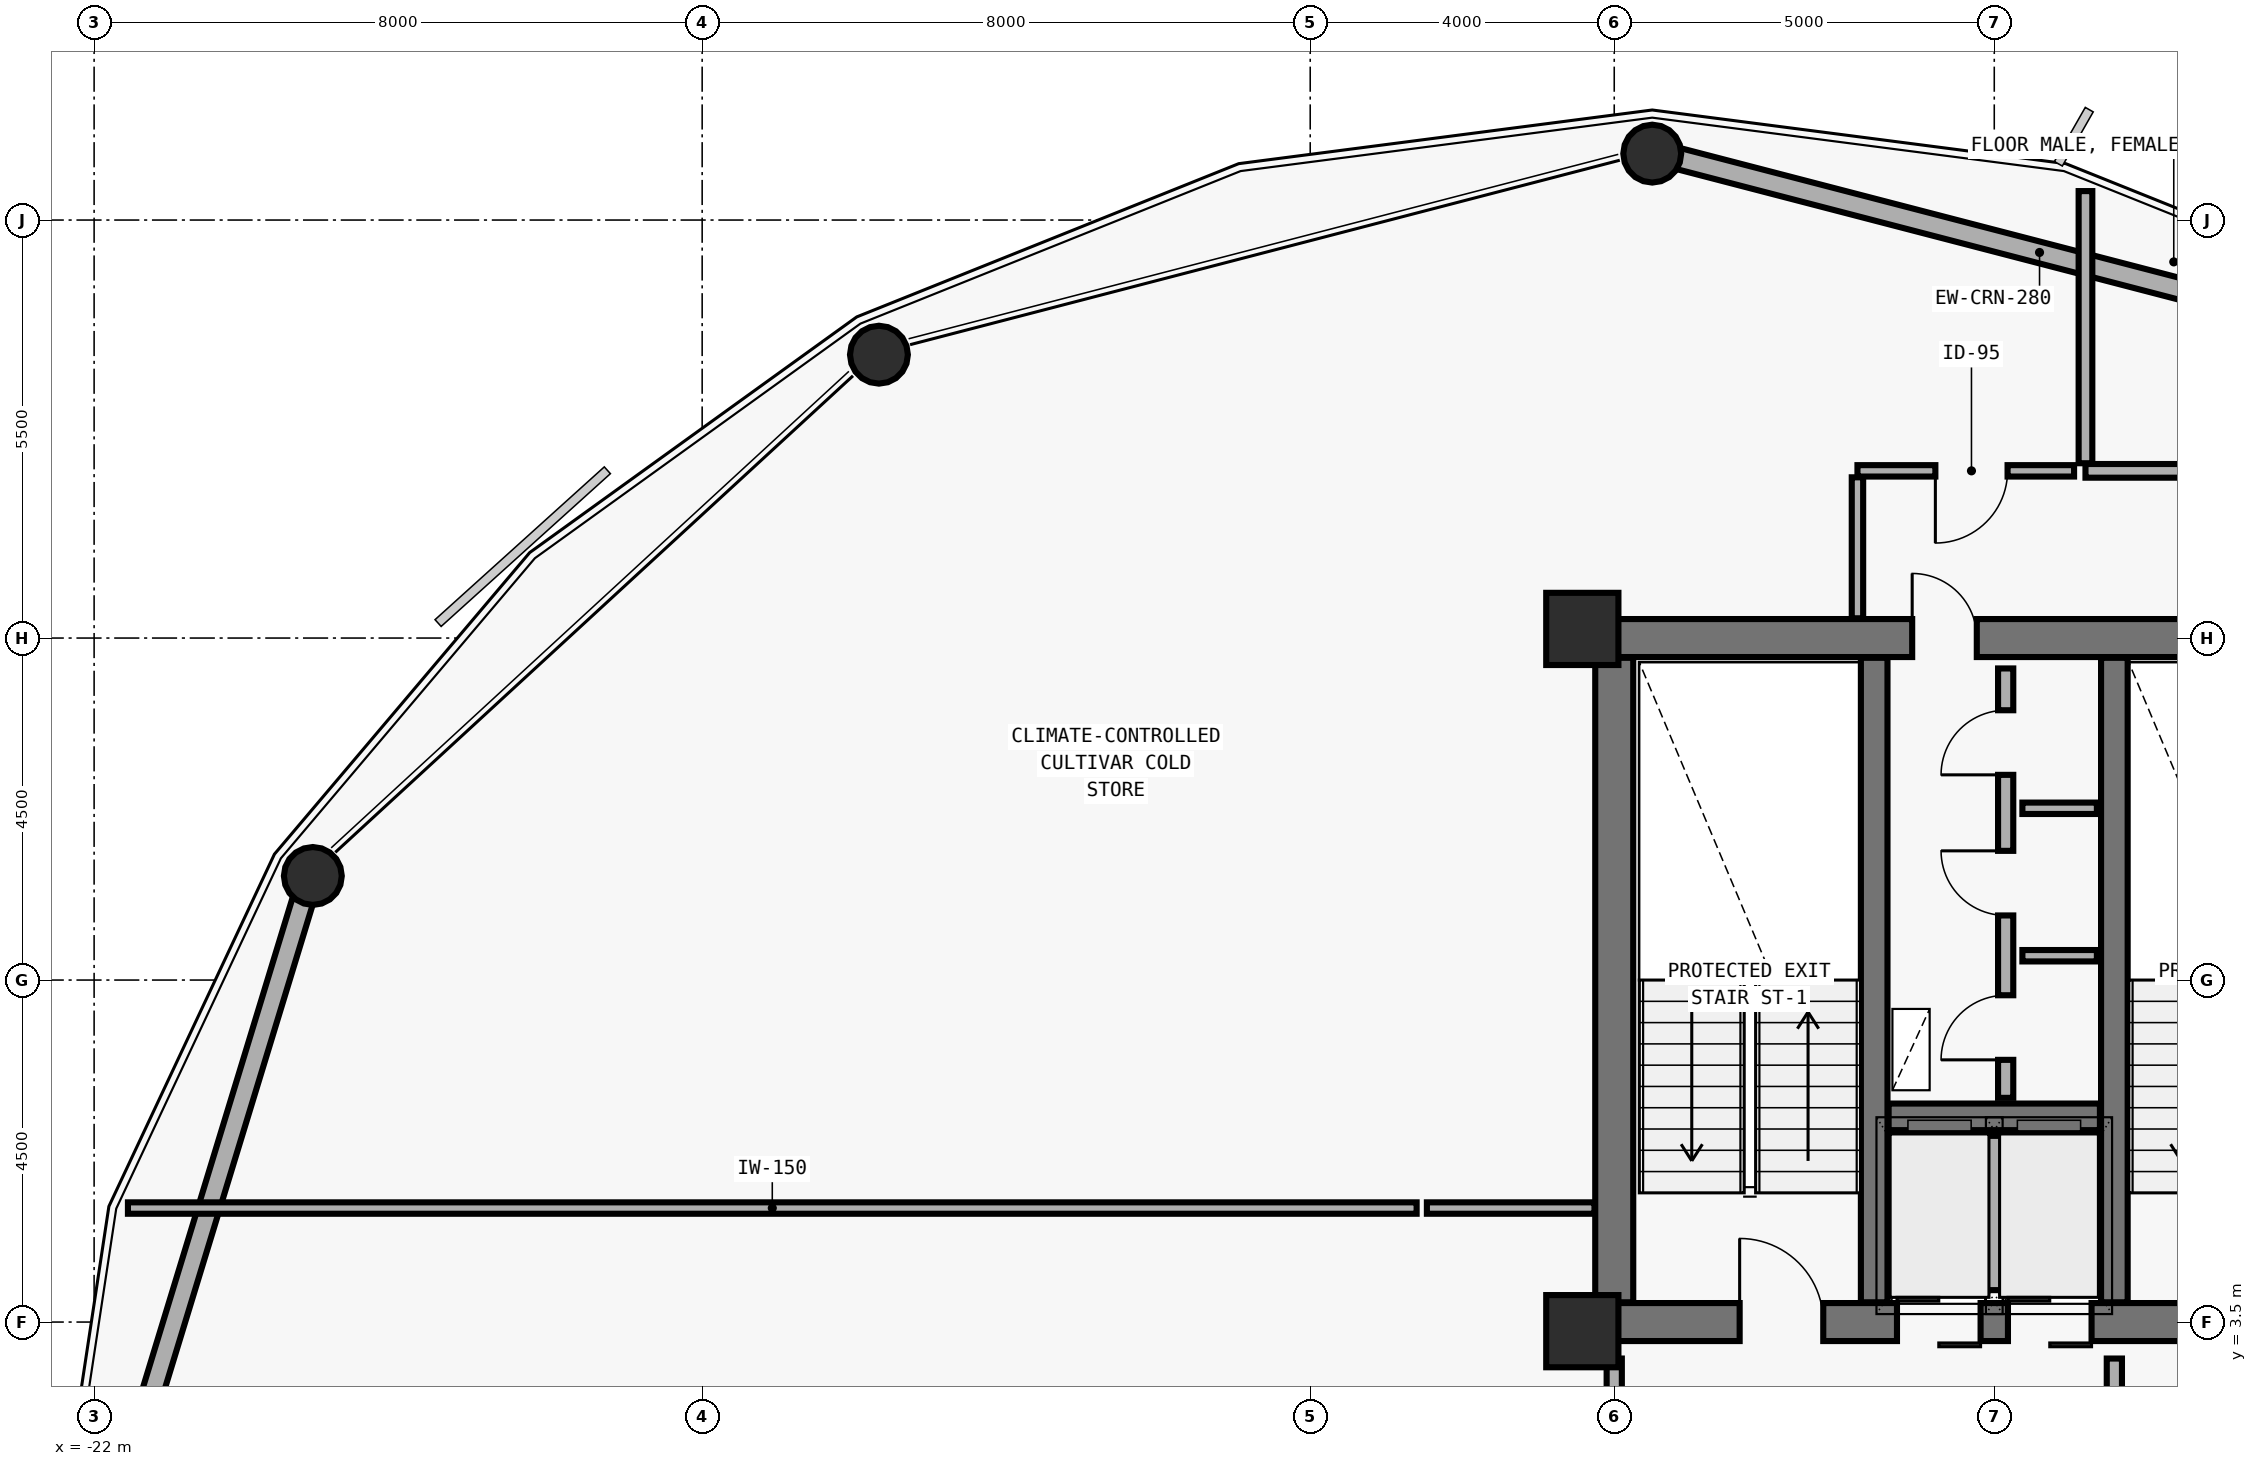
"""IFC4 building model, lengths in metres.
Left out: names, types, materials, properties, quantities, classifications, styles, units other than length and angle.
Written with IfcOpenShell. Run it as: python <this file> out.ifc"""

import sys

from ifc_helpers import new_model, si_unit, direction, frame, frame_2d, origin, origin_2d, place, context, subcontext, project, spatial, rectangle, hollow_circle, extrude, element, fill, save


model = new_model("IFC4")
c1 = context("Model", 3, precision=1e-05, world=origin(), true_north=direction((0.0, 1.0)))
c2 = subcontext(c1, "Body", "Model", "MODEL_VIEW")
j1 = project(units=[si_unit("LENGTHUNIT", "METRE"), si_unit("PLANEANGLEUNIT", "RADIAN")], contexts=[c1])
p1 = place(None, origin())
s1 = spatial("IfcSite", under=j1, at=p1, CompositionType="ELEMENT")
p2 = place(p1, origin())
s2 = spatial("IfcBuilding", under=s1, at=p2, CompositionType="ELEMENT")
p3 = place(p2, frame((0.0, 0.0, 165.6)))
s3 = spatial("IfcBuildingStorey", under=s2, at=p3, CompositionType="ELEMENT", Elevation=165.6)
p4 = place(p3, frame((-2.0, 3.5, 0.0), z_axis=(0.0, 0.0, 1.0), x_axis=(1.0, 0.0, 0.0)))
e1 = element("IfcWall", 1, at=p4, inside=s3, PredefinedType="SHEAR", context=c2, shape_type="SweptSolid", body=[
    extrude(rectangle(XDim=10.0, YDim=0.5, at=frame_2d((5.0, 0.0))), origin(), (0.0, 0.0, 1.0), 3.892),
])
p5 = place(p4, frame((1.65, 0.0, 0.0)))
e2 = element("IfcOpeningElement", 2, at=p5, cuts=e1, PredefinedType="OPENING", context=c2, shape_type="SweptSolid", body=[
    extrude(rectangle(XDim=1.1, YDim=2.15, at=frame_2d((0.55, 1.075))), frame((0.0, 0.26, 0.0), z_axis=(0.0, -1.0, 0.0), x_axis=(1.0, 0.0, 0.0)), (0.0, 0.0, 1.0), 0.52),
])
p6 = place(p4, frame((7.65, 0.0, 0.0)))
e3 = element("IfcOpeningElement", 3, at=p6, cuts=e1, PredefinedType="OPENING", context=c2, shape_type="SweptSolid", body=[
    extrude(rectangle(XDim=1.1, YDim=2.15, at=frame_2d((0.55, 1.075))), frame((0.0, 0.26, 0.0), z_axis=(0.0, -1.0, 0.0), x_axis=(1.0, 0.0, 0.0)), (0.0, 0.0, 1.0), 0.52),
])
p7 = place(p4, frame((3.72, 0.0, 0.0)))
e4 = element("IfcOpeningElement", 4, at=p7, cuts=e1, PredefinedType="OPENING", context=c2, shape_type="SweptSolid", body=[
    extrude(rectangle(XDim=1.1, YDim=2.2, at=frame_2d((0.55, 1.1))), frame((0.0, 0.26, 0.0), z_axis=(0.0, -1.0, 0.0), x_axis=(1.0, 0.0, 0.0)), (0.0, 0.0, 1.0), 0.52),
])
p8 = place(p4, frame((5.18, 0.0, 0.0)))
e5 = element("IfcOpeningElement", 5, at=p8, cuts=e1, PredefinedType="OPENING", context=c2, shape_type="SweptSolid", body=[
    extrude(rectangle(XDim=1.1, YDim=2.2, at=frame_2d((0.55, 1.1))), frame((0.0, 0.26, 0.0), z_axis=(0.0, -1.0, 0.0), x_axis=(1.0, 0.0, 0.0)), (0.0, 0.0, 1.0), 0.52),
])
p9 = place(p3, frame((-2.0, 12.5, 0.0), z_axis=(0.0, 0.0, 1.0), x_axis=(1.0, 0.0, 0.0)))
e6 = element("IfcWall", 6, at=p9, inside=s3, PredefinedType="SHEAR", context=c2, shape_type="SweptSolid", body=[
    extrude(rectangle(XDim=10.0, YDim=0.5, at=frame_2d((5.0, 0.0))), origin(), (0.0, 0.0, 1.0), 3.892),
])
p10 = place(p9, frame((3.92, 0.0, 0.0)))
e7 = element("IfcOpeningElement", 7, at=p10, cuts=e6, PredefinedType="OPENING", context=c2, shape_type="SweptSolid", body=[
    extrude(rectangle(XDim=0.85, YDim=2.1, at=frame_2d((0.425, 1.05))), frame((0.0, 0.26, 0.0), z_axis=(0.0, -1.0, 0.0), x_axis=(1.0, 0.0, 0.0)), (0.0, 0.0, 1.0), 0.52),
])
p11 = place(p3, frame((-2.0, 3.76, 0.0), z_axis=(0.0, 0.0, 1.0), x_axis=(0.0, 1.0, 0.0)))
e8 = element("IfcWall", 8, at=p11, inside=s3, PredefinedType="SHEAR", context=c2, shape_type="SweptSolid", body=[
    extrude(rectangle(XDim=8.48, YDim=0.5, at=frame_2d((4.24, 0.0))), origin(), (0.0, 0.0, 1.0), 3.892),
])
for number, where, z_axis, x_axis in (
    (9, (1.42, 3.76, 0.0), (0.0, 0.0, 1.0), (0.0, 1.0, 0.0)),
    (10, (4.58, 3.76, 0.0), (0.0, 0.0, 1.0), (0.0, 1.0, 0.0)),
):
    element("IfcWall", number, at=place(p3, frame(where, z_axis=z_axis, x_axis=x_axis)), inside=s3, PredefinedType="SHEAR", context=c2, shape_type="SweptSolid", body=[
        extrude(rectangle(XDim=8.48, YDim=0.35, at=frame_2d((4.24, 0.0))), origin(), (0.0, 0.0, 1.0), 3.892),
    ])
p12 = place(p3, frame((1.61, 6.2, 0.0), z_axis=(0.0, 0.0, 1.0), x_axis=(1.0, 0.0, 0.0)))
e11 = element("IfcWall", 11, at=p12, inside=s3, PredefinedType="SHEAR", context=c2, shape_type="SweptSolid", body=[
    extrude(rectangle(XDim=2.78, YDim=0.35, at=frame_2d((1.39, 0.0))), origin(), (0.0, 0.0, 1.0), 3.892),
])
for number, where, z_axis, x_axis in (
    (12, (-2.42, 12.62, 0.0), (0.0, 0.0, 1.0), (1.0, 0.0, 0.0)),
    (13, (-2.42, 3.38, 0.0), (0.0, 0.0, 1.0), (1.0, 0.0, 0.0)),
):
    element("IfcColumn", number, at=place(p3, frame(where, z_axis=z_axis, x_axis=x_axis)), inside=s3, PredefinedType="COLUMN", context=c2, shape_type="SweptSolid", body=[
        extrude(rectangle(XDim=0.95, YDim=0.95, at=origin_2d()), origin(), (0.0, 0.0, 1.0), 3.875),
    ])
p13 = place(p3, frame((-1.5, 18.898, 0.0), z_axis=(0.0, -0.013868880419, 0.999903822453), x_axis=(1.0, 0.0, 0.0)))
e14 = element("IfcColumn", 14, at=p13, inside=s3, PredefinedType="COLUMN", context=c2, shape_type="SweptSolid", body=[
    extrude(hollow_circle(Radius=0.381, WallThickness=0.028, at=origin_2d()), origin(), (0.0, 0.0, 1.0), 3.45),
])
for number, where, z_axis, x_axis in (
    (15, (-11.691, 16.249, 0.0), (0.01, -0.012, 1.0), (0.779, 0.627, 0.0)),
    (16, (-19.151, 9.382, 0.0), (0.017, -0.007, 1.0), (0.384, 0.923, 0.0)),
):
    element("IfcColumn", number, at=place(p3, frame(where, z_axis=z_axis, x_axis=x_axis)), inside=s3, PredefinedType="COLUMN", context=c2, shape_type="SweptSolid", body=[
        extrude(hollow_circle(Radius=0.381, WallThickness=0.028, at=origin_2d()), origin(), (0.0, 0.0, 1.0), 3.45),
    ])
p14 = place(p3, frame((-1.175, 18.813, 0.0), z_axis=(0.0, 0.0, 1.0), x_axis=(0.967842287651, -0.251557759242, 0.0)))
e17 = element("IfcWall", 17, at=p14, inside=s3, PredefinedType="SOLIDWALL", context=c2, shape_type="SweptSolid", body=[
    extrude(rectangle(XDim=9.857, YDim=0.28, at=frame_2d((4.929, 0.0))), origin(), (0.0, 0.0, 1.0), 2.97),
])
p15 = place(p3, frame((-21.919, 0.321, 0.0), z_axis=(0.0, 0.0, 1.0), x_axis=(0.292111961986, 0.956384128719, 0.0)))
e18 = element("IfcWall", 18, at=p15, inside=s3, PredefinedType="SOLIDWALL", context=c2, shape_type="SweptSolid", body=[
    extrude(rectangle(XDim=9.137, YDim=0.28, at=frame_2d((4.569, 0.0))), origin(), (0.0, 0.0, 1.0), 2.97),
])
p16 = place(p3, frame((3.0, 3.92, 0.0), z_axis=(0.0, 0.0, 1.0), x_axis=(0.0, 1.0, 0.0)))
e19 = element("IfcWall", 19, at=p16, inside=s3, PredefinedType="SOLIDWALL", context=c2, shape_type="SweptSolid", body=[
    extrude(rectangle(XDim=2.03, YDim=0.2, at=frame_2d((1.015, 0.0))), origin(), (0.0, 0.0, 1.0), 3.45),
])
p17 = place(p3, frame((3.15, 6.45, 0.0), z_axis=(0.0, 0.0, 1.0), x_axis=(0.0, 1.0, 0.0)))
e20 = element("IfcWall", 20, at=p17, inside=s3, PredefinedType="MOVABLE", context=c2, shape_type="SweptSolid", body=[
    extrude(rectangle(XDim=5.65, YDim=0.2, at=frame_2d((2.825, 0.0))), origin(), (0.0, 0.0, 1.0), 3.45),
])
p18 = place(p17, frame((0.5, 0.0, 0.0)))
e21 = element("IfcOpeningElement", 21, at=p18, cuts=e20, PredefinedType="OPENING", context=c2, shape_type="SweptSolid", body=[
    extrude(rectangle(XDim=0.85, YDim=2.1, at=frame_2d((0.425, 1.05))), frame((0.0, 0.11, 0.0), z_axis=(0.0, -1.0, 0.0), x_axis=(1.0, 0.0, 0.0)), (0.0, 0.0, 1.0), 0.22),
])
p19 = place(p17, frame((2.4, 0.0, 0.0)))
e22 = element("IfcOpeningElement", 22, at=p19, cuts=e20, PredefinedType="OPENING", context=c2, shape_type="SweptSolid", body=[
    extrude(rectangle(XDim=0.85, YDim=2.1, at=frame_2d((0.425, 1.05))), frame((0.0, 0.11, 0.0), z_axis=(0.0, -1.0, 0.0), x_axis=(1.0, 0.0, 0.0)), (0.0, 0.0, 1.0), 0.22),
])
p20 = place(p17, frame((4.25, 0.0, 0.0)))
e23 = element("IfcOpeningElement", 23, at=p20, cuts=e20, PredefinedType="OPENING", context=c2, shape_type="SweptSolid", body=[
    extrude(rectangle(XDim=0.85, YDim=2.1, at=frame_2d((0.425, 1.05))), frame((0.0, 0.11, 0.0), z_axis=(0.0, -1.0, 0.0), x_axis=(1.0, 0.0, 0.0)), (0.0, 0.0, 1.0), 0.22),
])
p21 = place(p3, frame((4.58, 0.83, 0.0), z_axis=(0.0, 0.0, 1.0), x_axis=(0.0, 1.0, 0.0)))
e24 = element("IfcWall", 24, at=p21, inside=s3, PredefinedType="MOVABLE", context=c2, shape_type="SweptSolid", body=[
    extrude(rectangle(XDim=2.19, YDim=0.2, at=frame_2d((1.095, 0.0))), origin(), (0.0, 0.0, 1.0), 3.45),
])
p22 = place(p21, frame((0.66, 0.0, 0.0)))
e25 = element("IfcOpeningElement", 25, at=p22, cuts=e24, PredefinedType="OPENING", context=c2, shape_type="SweptSolid", body=[
    extrude(rectangle(XDim=1.0, YDim=2.1, at=frame_2d((0.5, 1.05))), frame((0.0, 0.11, 0.0), z_axis=(0.0, -1.0, 0.0), x_axis=(1.0, 0.0, 0.0)), (0.0, 0.0, 1.0), 0.22),
])
p23 = place(p3, frame((8.0, 14.7, 0.0), z_axis=(0.0, 0.0, 1.0), x_axis=(-1.0, 0.0, 0.0)))
e26 = element("IfcWall", 26, at=p23, inside=s3, PredefinedType="PLUMBINGWALL", context=c2, shape_type="SweptSolid", body=[
    extrude(rectangle(XDim=3.8, YDim=0.18, at=frame_2d((1.9, 0.0))), origin(), (0.0, 0.0, 1.0), 3.032),
])
p24 = place(p23, frame((1.425, 0.0, 0.0)))
e27 = element("IfcOpeningElement", 27, at=p24, cuts=e26, PredefinedType="OPENING", context=c2, shape_type="SweptSolid", body=[
    extrude(rectangle(XDim=0.95, YDim=2.1, at=frame_2d((0.475, 1.05))), frame((0.0, 0.1, 0.0), z_axis=(0.0, -1.0, 0.0), x_axis=(1.0, 0.0, 0.0)), (0.0, 0.0, 1.0), 0.2),
])
p25 = place(p3, frame((4.05, 14.7, 0.0), z_axis=(0.0, 0.0, 1.0), x_axis=(-1.0, 0.0, 0.0)))
e28 = element("IfcWall", 28, at=p25, inside=s3, PredefinedType="PARTITIONING", context=c2, shape_type="SweptSolid", body=[
    extrude(rectangle(XDim=2.85, YDim=0.15, at=frame_2d((1.425, 0.0))), origin(), (0.0, 0.0, 1.0), 3.032),
])
p26 = place(p25, frame((0.875, 0.0, 0.0)))
e29 = element("IfcOpeningElement", 29, at=p26, cuts=e28, PredefinedType="OPENING", context=c2, shape_type="SweptSolid", body=[
    extrude(rectangle(XDim=0.95, YDim=2.1, at=frame_2d((0.475, 1.05))), frame((0.0, 0.085, 0.0), z_axis=(0.0, -1.0, 0.0), x_axis=(1.0, 0.0, 0.0)), (0.0, 0.0, 1.0), 0.17),
])
for number, where, z_axis, x_axis in (
    (30, (3.37, 8.32, 0.0), (0.0, 0.0, 1.0), (1.0, 0.0, 0.0)),
    (31, (3.37, 10.26, 0.0), (0.0, 0.0, 1.0), (1.0, 0.0, 0.0)),
):
    element("IfcWall", number, at=place(p3, frame(where, z_axis=z_axis, x_axis=x_axis)), inside=s3, PredefinedType="PARTITIONING", context=c2, shape_type="SweptSolid", body=[
        extrude(rectangle(XDim=0.98, YDim=0.15, at=frame_2d((0.49, 0.0))), origin(), (0.0, 0.0, 1.0), 3.45),
    ])
p27 = place(p3, frame((-2.0, 0.72, 0.0), z_axis=(0.0, 0.0, 1.0), x_axis=(0.0, 1.0, 0.0)))
e32 = element("IfcWall", 32, at=p27, inside=s3, PredefinedType="MOVABLE", context=c2, shape_type="SweptSolid", body=[
    extrude(rectangle(XDim=2.3, YDim=0.2, at=frame_2d((1.15, 0.0))), origin(), (0.0, 0.0, 1.0), 2.782),
])
p28 = place(p3, frame((-21.555, 5.0, 0.0), z_axis=(0.0, 0.0, 1.0), x_axis=(1.0, 0.0, 0.0)))
e33 = element("IfcWall", 33, at=p28, inside=s3, PredefinedType="PARTITIONING", context=c2, shape_type="SweptSolid", body=[
    extrude(rectangle(XDim=16.955, YDim=0.15, at=frame_2d((8.478, 0.0))), origin(), (0.0, 0.0, 1.0), 3.45),
])
p29 = place(p3, frame((-4.465, 5.0, 0.0), z_axis=(0.0, 0.0, 1.0), x_axis=(1.0, 0.0, 0.0)))
e34 = element("IfcWall", 34, at=p29, inside=s3, PredefinedType="PARTITIONING", context=c2, shape_type="SweptSolid", body=[
    extrude(rectangle(XDim=2.205, YDim=0.15, at=frame_2d((1.103, 0.0))), origin(), (0.0, 0.0, 1.0), 3.45),
])
p30 = place(p3, frame((1.2, 14.615, 0.0), z_axis=(0.0, 0.0, 1.0), x_axis=(0.0, -1.0, 0.0)))
e35 = element("IfcWall", 35, at=p30, inside=s3, PredefinedType="PARTITIONING", context=c2, shape_type="SweptSolid", body=[
    extrude(rectangle(XDim=1.855, YDim=0.15, at=frame_2d((0.927, 0.0))), origin(), (0.0, 0.0, 1.0), 3.45),
])
p31 = place(p3, frame((4.2, 18.381, 0.0), z_axis=(0.0, 0.0, 1.0), x_axis=(0.0, -1.0, 0.0)))
e36 = element("IfcWall", 36, at=p31, inside=s3, PredefinedType="PLUMBINGWALL", context=c2, shape_type="SweptSolid", body=[
    extrude(rectangle(XDim=3.581, YDim=0.18, at=frame_2d((1.791, 0.0))), origin(), (0.0, 0.0, 1.0), 3.45),
])
p32 = place(p5, origin())
e37 = element("IfcDoor", 37, at=p32, inside=s3, OperationType="SINGLE_SWING_LEFT", PredefinedType="DOOR", context=c2, shape_type="SweptSolid", body=[
    extrude(rectangle(XDim=1.1, YDim=2.15, at=frame_2d((0.55, 1.075))), frame((0.0, 0.025, 0.0), z_axis=(0.0, -1.0, 0.0), x_axis=(1.0, 0.0, 0.0)), (0.0, 0.0, 1.0), 0.05),
])
fill(e2, e37)
p33 = place(p7, origin())
e38 = element("IfcDoor", 38, at=p33, inside=s3, OperationType="DOUBLE_DOOR_SLIDING", PredefinedType="DOOR", context=c2, shape_type="SweptSolid", body=[
    extrude(rectangle(XDim=1.1, YDim=2.2, at=frame_2d((0.55, 1.1))), frame((0.0, 0.025, 0.0), z_axis=(0.0, -1.0, 0.0), x_axis=(1.0, 0.0, 0.0)), (0.0, 0.0, 1.0), 0.05),
])
fill(e4, e38)
p34 = place(p8, origin())
e39 = element("IfcDoor", 39, at=p34, inside=s3, OperationType="DOUBLE_DOOR_SLIDING", PredefinedType="DOOR", context=c2, shape_type="SweptSolid", body=[
    extrude(rectangle(XDim=1.1, YDim=2.2, at=frame_2d((0.55, 1.1))), frame((0.0, 0.025, 0.0), z_axis=(0.0, -1.0, 0.0), x_axis=(1.0, 0.0, 0.0)), (0.0, 0.0, 1.0), 0.05),
])
fill(e5, e39)
p35 = place(p10, origin())
e40 = element("IfcDoor", 40, at=p35, inside=s3, OperationType="SINGLE_SWING_LEFT", PredefinedType="DOOR", context=c2, shape_type="SweptSolid", body=[
    extrude(rectangle(XDim=0.85, YDim=2.1, at=frame_2d((0.425, 1.05))), frame((0.0, 0.025, 0.0), z_axis=(0.0, -1.0, 0.0), x_axis=(1.0, 0.0, 0.0)), (0.0, 0.0, 1.0), 0.05),
])
fill(e7, e40)
p36 = place(p18, origin())
e41 = element("IfcDoor", 41, at=p36, inside=s3, OperationType="SINGLE_SWING_LEFT", PredefinedType="DOOR", context=c2, shape_type="SweptSolid", body=[
    extrude(rectangle(XDim=0.85, YDim=2.1, at=frame_2d((0.425, 1.05))), frame((0.0, 0.025, 0.0), z_axis=(0.0, -1.0, 0.0), x_axis=(1.0, 0.0, 0.0)), (0.0, 0.0, 1.0), 0.05),
])
fill(e21, e41)
p37 = place(p19, origin())
e42 = element("IfcDoor", 42, at=p37, inside=s3, OperationType="SINGLE_SWING_RIGHT", PredefinedType="DOOR", context=c2, shape_type="SweptSolid", body=[
    extrude(rectangle(XDim=0.85, YDim=2.1, at=frame_2d((0.425, 1.05))), frame((0.0, 0.025, 0.0), z_axis=(0.0, -1.0, 0.0), x_axis=(1.0, 0.0, 0.0)), (0.0, 0.0, 1.0), 0.05),
])
fill(e22, e42)
p38 = place(p20, origin())
e43 = element("IfcDoor", 43, at=p38, inside=s3, OperationType="SINGLE_SWING_LEFT", PredefinedType="DOOR", context=c2, shape_type="SweptSolid", body=[
    extrude(rectangle(XDim=0.85, YDim=2.1, at=frame_2d((0.425, 1.05))), frame((0.0, 0.025, 0.0), z_axis=(0.0, -1.0, 0.0), x_axis=(1.0, 0.0, 0.0)), (0.0, 0.0, 1.0), 0.05),
])
fill(e23, e43)
p39 = place(p26, origin())
e44 = element("IfcDoor", 44, at=p39, inside=s3, OperationType="SINGLE_SWING_RIGHT", PredefinedType="DOOR", context=c2, shape_type="SweptSolid", body=[
    extrude(rectangle(XDim=0.95, YDim=2.1, at=frame_2d((0.475, 1.05))), frame((0.0, 0.025, 0.0), z_axis=(0.0, -1.0, 0.0), x_axis=(1.0, 0.0, 0.0)), (0.0, 0.0, 1.0), 0.05),
])
fill(e29, e44)
save(model, sys.argv[1])
